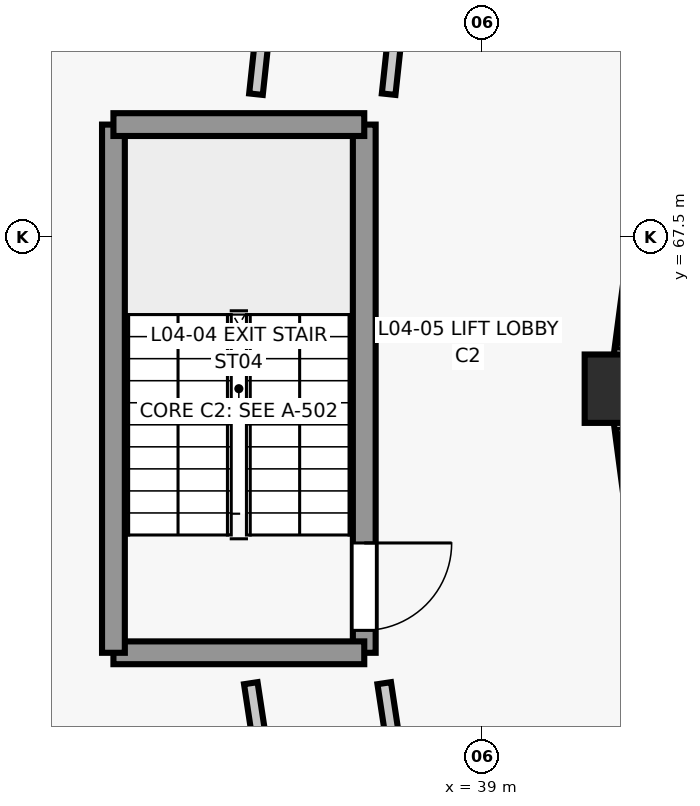
"""IFC4 building model, lengths in metres.
Left out: names, types, materials, properties, quantities, classifications, styles, units other than length and angle.
Written with IfcOpenShell. Run it as: python <this file> out.ifc"""

import sys

from ifc_helpers import new_model, si_unit, direction, frame, frame_2d, origin, origin_2d, place, context, subcontext, project, spatial, rectangle, circle, extrude, element, fill, save


model = new_model("IFC4")
c1 = context("Model", 3, precision=1e-05, world=origin(), true_north=direction((0.0, 1.0)))
c2 = subcontext(c1, "Body", "Model", "MODEL_VIEW")
j1 = project(units=[si_unit("LENGTHUNIT", "METRE"), si_unit("PLANEANGLEUNIT", "RADIAN")], contexts=[c1])
p1 = place(None, origin())
s1 = spatial("IfcSite", under=j1, at=p1, CompositionType="ELEMENT")
p2 = place(p1, origin())
s2 = spatial("IfcBuilding", under=s1, at=p2, CompositionType="ELEMENT")
p3 = place(p2, frame((0.0, 0.0, 16.5)))
s3 = spatial("IfcBuildingStorey", under=s2, at=p3, CompositionType="ELEMENT", Elevation=16.5)
p4 = place(p3, frame((40.8, 65.5, 0.0), z_axis=(0.0, 0.0, 1.0), x_axis=(1.0, 0.0, 0.0)))
e1 = element("IfcColumn", 1, at=p4, inside=s3, PredefinedType="COLUMN", context=c2, shape_type="SweptSolid", body=[
    extrude(circle(Radius=0.45, at=origin_2d()), origin(), (0.0, 0.0, 1.0), 3.9),
])
p5 = place(p3, frame((31.963, 65.975, 0.0), z_axis=(0.0, 0.0, 1.0), x_axis=(0.130513242145, 0.991446566197, 0.0)))
e2 = element("IfcWall", 2, at=p5, inside=s3, PredefinedType="STANDARD", context=c2, shape_type="SweptSolid", body=[
    extrude(rectangle(XDim=11.076, YDim=0.28, at=frame_2d((5.538, 0.0))), origin(), (0.0, 0.0, 1.0), 0.82),
])
p6 = place(p3, frame((42.031, 74.853, 0.0), z_axis=(0.0, 0.0, 1.0), x_axis=(-0.130549698469, -0.991441766434, 0.0)))
e3 = element("IfcWall", 3, at=p6, inside=s3, PredefinedType="STANDARD", context=c2, shape_type="SweptSolid", body=[
    extrude(rectangle(XDim=9.156, YDim=0.25, at=frame_2d((4.578, 0.0))), origin(), (0.0, 0.0, 1.0), 0.82),
])
p7 = place(p3, frame((33.408, 54.044, 0.0), z_axis=(0.0, 0.0, 1.0), x_axis=(-0.130513242145, 0.991446566197, 0.0)))
e4 = element("IfcWall", 4, at=p7, inside=s3, PredefinedType="STANDARD", context=c2, shape_type="SweptSolid", body=[
    extrude(rectangle(XDim=11.076, YDim=0.28, at=frame_2d((5.538, 0.0))), origin(), (0.0, 0.0, 1.0), 2.846),
])
p8 = place(p7, frame((4.813, 0.0, 0.85)))
e5 = element("IfcOpeningElement", 5, at=p8, cuts=e4, PredefinedType="OPENING", context=c2, shape_type="SweptSolid", body=[
    extrude(rectangle(XDim=1.45, YDim=1.75, at=frame_2d((0.725, 0.875))), frame((0.0, 0.15, 0.0), z_axis=(0.0, -1.0, 0.0), x_axis=(1.0, 0.0, 0.0)), (0.0, 0.0, 1.0), 0.3),
])
p9 = place(p3, frame((40.836, 65.225, 0.0), z_axis=(0.0, 0.0, 1.0), x_axis=(0.130549698469, -0.991441766434, 0.0)))
e6 = element("IfcWall", 6, at=p9, inside=s3, PredefinedType="STANDARD", context=c2, shape_type="SweptSolid", body=[
    extrude(rectangle(XDim=9.156, YDim=0.25, at=frame_2d((4.578, 0.0))), origin(), (0.0, 0.0, 1.0), 0.82),
])
p10 = place(p3, frame((37.45, 68.975, 0.0), z_axis=(0.0, 0.0, 1.0), x_axis=(0.0, -1.0, 0.0)))
e7 = element("IfcWall", 7, at=p10, inside=s3, PredefinedType="SHEAR", context=c2, shape_type="SweptSolid", body=[
    extrude(rectangle(XDim=6.95, YDim=0.3, at=frame_2d((3.475, 0.0))), origin(), (0.0, 0.0, 1.0), 3.9),
])
p11 = place(p10, frame((5.505, 0.0, 0.0)))
e8 = element("IfcOpeningElement", 8, at=p11, cuts=e7, PredefinedType="OPENING", context=c2, shape_type="SweptSolid", body=[
    extrude(rectangle(XDim=1.15, YDim=2.15, at=frame_2d((0.575, 1.075))), frame((0.0, 0.16, 0.0), z_axis=(0.0, -1.0, 0.0), x_axis=(1.0, 0.0, 0.0)), (0.0, 0.0, 1.0), 0.32),
])
p12 = place(p3, frame((37.45, 62.025, 0.0), z_axis=(0.0, 0.0, 1.0), x_axis=(-1.0, 0.0, 0.0)))
e9 = element("IfcWall", 9, at=p12, inside=s3, PredefinedType="SHEAR", context=c2, shape_type="SweptSolid", body=[
    extrude(rectangle(XDim=3.3, YDim=0.3, at=frame_2d((1.65, 0.0))), origin(), (0.0, 0.0, 1.0), 3.9),
])
p13 = place(p3, frame((34.15, 62.025, 0.0), z_axis=(0.0, 0.0, 1.0), x_axis=(0.0, 1.0, 0.0)))
e10 = element("IfcWall", 10, at=p13, inside=s3, PredefinedType="SHEAR", context=c2, shape_type="SweptSolid", body=[
    extrude(rectangle(XDim=6.95, YDim=0.3, at=frame_2d((3.475, 0.0))), origin(), (0.0, 0.0, 1.0), 3.9),
])
p14 = place(p3, frame((34.15, 68.975, 0.0), z_axis=(0.0, 0.0, 1.0), x_axis=(1.0, 0.0, 0.0)))
e11 = element("IfcWall", 11, at=p14, inside=s3, PredefinedType="SHEAR", context=c2, shape_type="SweptSolid", body=[
    extrude(rectangle(XDim=3.3, YDim=0.3, at=frame_2d((1.65, 0.0))), origin(), (0.0, 0.0, 1.0), 3.9),
])
p15 = place(p3, frame((36.674, 75.421, 0.0), z_axis=(0.0, 0.0, 1.0), x_axis=(-0.106711734721, -0.994290000791, 0.0)))
e12 = element("IfcWall", 12, at=p15, inside=s3, PredefinedType="PARTITIONING", context=c2, shape_type="SweptSolid", body=[
    extrude(rectangle(XDim=6.081, YDim=0.18, at=frame_2d((3.041, 0.0))), origin(), (0.0, 0.0, 1.0), 3.635),
])
p16 = place(p15, frame((2.566, 0.0, 0.0)))
e13 = element("IfcOpeningElement", 13, at=p16, cuts=e12, PredefinedType="OPENING", context=c2, shape_type="SweptSolid", body=[
    extrude(rectangle(XDim=0.95, YDim=2.1, at=frame_2d((0.475, 1.05))), frame((0.0, 0.1, 0.0), z_axis=(0.0, -1.0, 0.0), x_axis=(1.0, 0.0, 0.0)), (0.0, 0.0, 1.0), 0.2),
])
p17 = place(p3, frame((38.376, 75.013, 0.0), z_axis=(0.0, 0.0, 1.0), x_axis=(-0.106692749775, -0.994292038159, 0.0)))
e14 = element("IfcWall", 14, at=p17, inside=s3, PredefinedType="PARTITIONING", context=c2, shape_type="SweptSolid", body=[
    extrude(rectangle(XDim=5.67, YDim=0.18, at=frame_2d((2.835, 0.0))), origin(), (0.0, 0.0, 1.0), 3.635),
])
p18 = place(p17, frame((2.31, 0.0, 0.0)))
e15 = element("IfcOpeningElement", 15, at=p18, cuts=e14, PredefinedType="OPENING", context=c2, shape_type="SweptSolid", body=[
    extrude(rectangle(XDim=1.05, YDim=2.1, at=frame_2d((0.525, 1.05))), frame((0.0, 0.1, 0.0), z_axis=(0.0, -1.0, 0.0), x_axis=(1.0, 0.0, 0.0)), (0.0, 0.0, 1.0), 0.2),
])
p19 = place(p3, frame((35.957, 61.625, 0.0), z_axis=(0.0, 0.0, 1.0), x_axis=(0.14997684897, -0.988689508781, 0.0)))
e16 = element("IfcWall", 16, at=p19, inside=s3, PredefinedType="PARTITIONING", context=c2, shape_type="SweptSolid", body=[
    extrude(rectangle(XDim=7.929, YDim=0.18, at=frame_2d((3.965, 0.0))), origin(), (0.0, 0.0, 1.0), 3.635),
])
p20 = place(p19, frame((3.365, 0.0, 0.0)))
e17 = element("IfcOpeningElement", 17, at=p20, cuts=e16, PredefinedType="OPENING", context=c2, shape_type="SweptSolid", body=[
    extrude(rectangle(XDim=1.2, YDim=2.15, at=frame_2d((0.6, 1.075))), frame((0.0, 0.1, 0.0), z_axis=(0.0, -1.0, 0.0), x_axis=(1.0, 0.0, 0.0)), (0.0, 0.0, 1.0), 0.2),
])
p21 = place(p3, frame((37.713, 61.625, 0.0), z_axis=(0.0, 0.0, 1.0), x_axis=(0.149968655248, -0.988690751673, 0.0)))
e18 = element("IfcWall", 18, at=p21, inside=s3, PredefinedType="PARTITIONING", context=c2, shape_type="SweptSolid", body=[
    extrude(rectangle(XDim=7.441, YDim=0.18, at=frame_2d((3.721, 0.0))), origin(), (0.0, 0.0, 1.0), 3.635),
])
p22 = place(p21, frame((2.971, 0.0, 0.0)))
e19 = element("IfcOpeningElement", 19, at=p22, cuts=e18, PredefinedType="OPENING", context=c2, shape_type="SweptSolid", body=[
    extrude(rectangle(XDim=1.5, YDim=2.15, at=frame_2d((0.75, 1.075))), frame((0.0, 0.1, 0.0), z_axis=(0.0, -1.0, 0.0), x_axis=(1.0, 0.0, 0.0)), (0.0, 0.0, 1.0), 0.2),
])
p23 = place(p11, origin())
e20 = element("IfcDoor", 20, at=p23, inside=s3, OperationType="SINGLE_SWING_LEFT", PredefinedType="DOOR", context=c2, shape_type="SweptSolid", body=[
    extrude(rectangle(XDim=1.15, YDim=2.15, at=frame_2d((0.575, 1.075))), frame((0.0, 0.025, 0.0), z_axis=(0.0, -1.0, 0.0), x_axis=(1.0, 0.0, 0.0)), (0.0, 0.0, 1.0), 0.05),
])
fill(e8, e20)
save(model, sys.argv[1])
